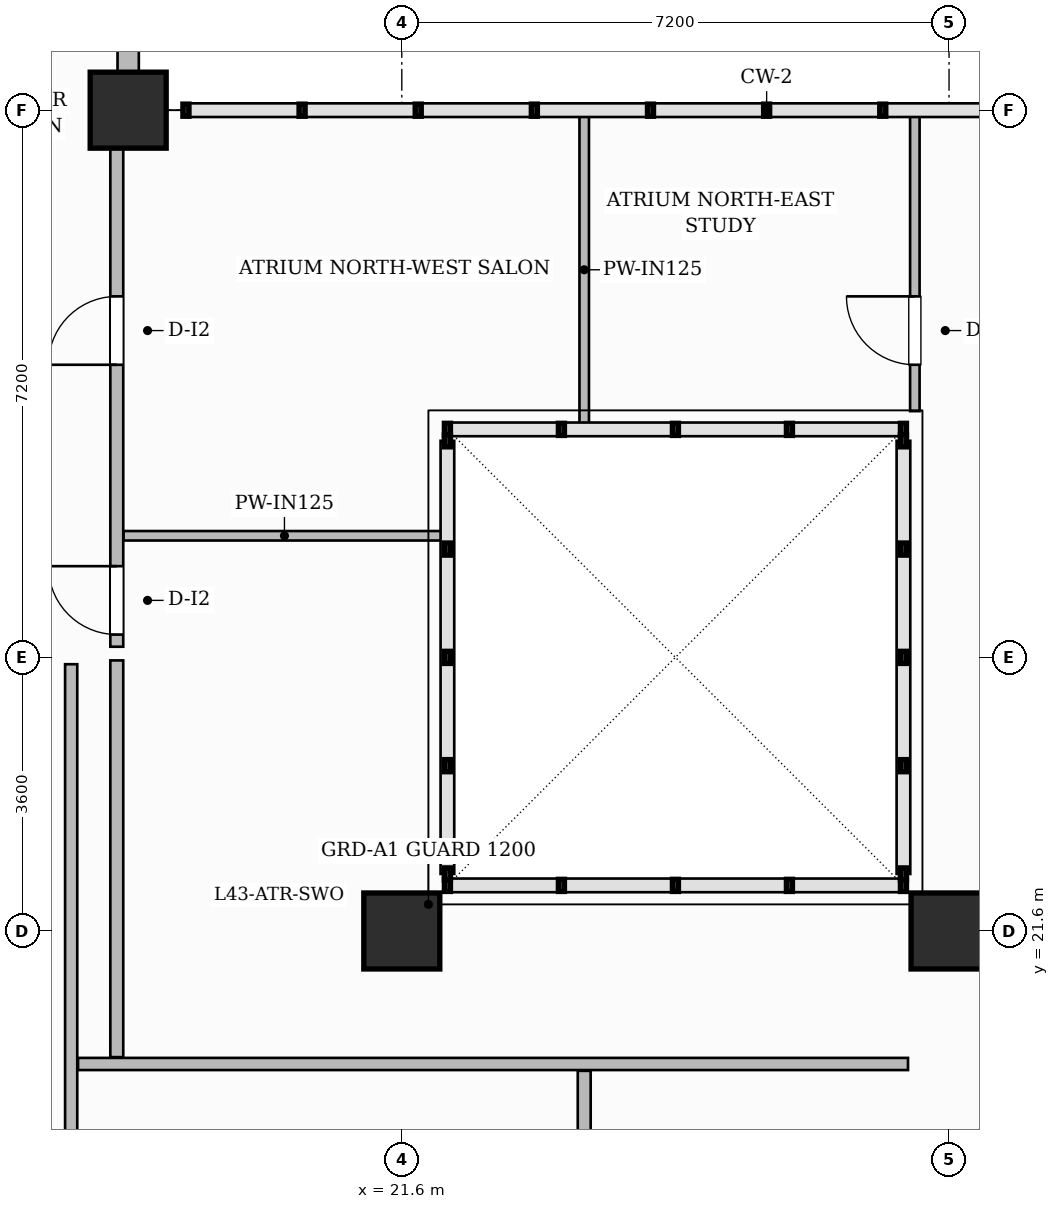
"""IFC4 building model, lengths in metres.
Left out: names, types, materials, properties, quantities, classifications, styles, units other than length and angle.
Written with IfcOpenShell. Run it as: python <this file> out.ifc"""

import sys

from ifc_helpers import new_model, si_unit, direction, frame, frame_2d, origin, origin_2d, place, context, subcontext, project, spatial, rectangle, extrude, source, transform, mapped, element, fill, save


model = new_model("IFC4")
c1 = context("Model", 3, precision=1e-05, world=origin(), true_north=direction((0.0, 1.0)))
c2 = subcontext(c1, "Body", "Model", "MODEL_VIEW")
j1 = project(units=[si_unit("LENGTHUNIT", "METRE"), si_unit("PLANEANGLEUNIT", "RADIAN")], contexts=[c1])
p1 = place(None, origin())
s1 = spatial("IfcSite", under=j1, at=p1, CompositionType="ELEMENT")
p2 = place(p1, origin())
s2 = spatial("IfcBuilding", under=s1, at=p2, CompositionType="ELEMENT")
p3 = place(p2, frame((0.0, 0.0, 173.4)))
s3 = spatial("IfcBuildingStorey", under=s2, at=p3, CompositionType="ELEMENT", Elevation=173.4)
m1 = source(origin(), c2, "Body", "SweptSolid", [
    extrude(rectangle(XDim=1.0, YDim=1.0, at=origin_2d()), origin(), (0.0, 0.0, 1.0), 3.85),
])
for number, where, z_axis, x_axis in (
    (1, (21.6, 21.6, 0.0), (0.0, 0.0, 1.0), (1.0, 0.0, 0.0)),
    (2, (28.8, 21.6, 0.0), (0.0, 0.0, 1.0), (1.0, 0.0, 0.0)),
    (3, (18.0, 32.4, 0.0), (0.0, 0.0, 1.0), (1.0, 0.0, 0.0)),
):
    element("IfcColumn", number, at=place(p3, frame(where, z_axis=z_axis, x_axis=x_axis)), inside=s3, PredefinedType="COLUMN", context=c2, shape_type="MappedRepresentation", body=[
        mapped(m1, transform((0.0, 0.0, 0.0), scale=1.0)),
    ])
p4 = place(p3, frame((17.25, 11.76, 0.0), z_axis=(0.0, 0.0, 1.0), x_axis=(0.0, 1.0, 0.0)))
e4 = element("IfcWall", 4, at=p4, inside=s3, PredefinedType="PARTITIONING", context=c2, shape_type="SweptSolid", body=[
    extrude(rectangle(XDim=13.35, YDim=0.16, at=frame_2d((6.675, 0.0))), origin(), (0.0, 0.0, 1.0), 3.6),
])
p5 = place(p3, frame((17.85, 19.94, 0.0), z_axis=(0.0, 0.0, 1.0), x_axis=(0.0, 1.0, 0.0)))
e5 = element("IfcWall", 5, at=p5, inside=s3, PredefinedType="PARTITIONING", context=c2, shape_type="SweptSolid", body=[
    extrude(rectangle(XDim=5.22, YDim=0.17, at=frame_2d((2.61, 0.0))), origin(), (0.0, 0.0, 1.0), 3.285),
])
p6 = place(p3, frame((17.85, 25.34, 0.0), z_axis=(0.0, 0.0, 1.0), x_axis=(0.0, 1.0, 0.0)))
e6 = element("IfcWall", 6, at=p6, inside=s3, PredefinedType="PARTITIONING", context=c2, shape_type="SweptSolid", body=[
    extrude(rectangle(XDim=6.87, YDim=0.17, at=frame_2d((3.435, 0.0))), origin(), (0.0, 0.0, 1.0), 3.6),
])
p7 = place(p6, frame((0.16, 0.0, 0.0)))
e7 = element("IfcOpeningElement", 7, at=p7, cuts=e6, PredefinedType="OPENING", context=c2, shape_type="SweptSolid", body=[
    extrude(rectangle(XDim=0.9, YDim=2.15, at=frame_2d((0.45, 1.075))), frame((0.0, 0.095, 0.0), z_axis=(0.0, -1.0, 0.0), x_axis=(1.0, 0.0, 0.0)), (0.0, 0.0, 1.0), 0.19),
])
p8 = place(p6, frame((3.71, 0.0, 0.0)))
e8 = element("IfcOpeningElement", 8, at=p8, cuts=e6, PredefinedType="OPENING", context=c2, shape_type="SweptSolid", body=[
    extrude(rectangle(XDim=0.9, YDim=2.15, at=frame_2d((0.45, 1.075))), frame((0.0, 0.095, 0.0), z_axis=(0.0, -1.0, 0.0), x_axis=(1.0, 0.0, 0.0)), (0.0, 0.0, 1.0), 0.19),
])
p9 = place(p3, frame((17.94, 26.8, 0.0), z_axis=(0.0, 0.0, 1.0), x_axis=(1.0, 0.0, 0.0)))
e9 = element("IfcWall", 9, at=p9, inside=s3, PredefinedType="PARTITIONING", context=c2, shape_type="SweptSolid", body=[
    extrude(rectangle(XDim=4.232, YDim=0.125, at=frame_2d((2.116, 0.0))), origin(), (0.0, 0.0, 1.0), 3.6),
])
p10 = place(p3, frame((24.0, 28.228, 0.0), z_axis=(0.0, 0.0, 1.0), x_axis=(0.0, 1.0, 0.0)))
e10 = element("IfcWall", 10, at=p10, inside=s3, PredefinedType="PARTITIONING", context=c2, shape_type="SweptSolid", body=[
    extrude(rectangle(XDim=4.144, YDim=0.125, at=frame_2d((2.072, 0.0))), origin(), (0.0, 0.0, 1.0), 3.6),
])
p11 = place(p3, frame((28.35, 28.44, 0.0), z_axis=(0.0, 0.0, 1.0), x_axis=(0.0, 1.0, 0.0)))
e11 = element("IfcWall", 11, at=p11, inside=s3, PredefinedType="PARTITIONING", context=c2, shape_type="SweptSolid", body=[
    extrude(rectangle(XDim=3.932, YDim=0.125, at=frame_2d((1.966, 0.0))), origin(), (0.0, 0.0, 1.0), 3.6),
])
p12 = place(p11, frame((0.61, 0.0, 0.0)))
e12 = element("IfcOpeningElement", 12, at=p12, cuts=e11, PredefinedType="OPENING", context=c2, shape_type="SweptSolid", body=[
    extrude(rectangle(XDim=0.9, YDim=2.15, at=frame_2d((0.45, 1.075))), frame((0.0, 0.073, 0.0), z_axis=(0.0, -1.0, 0.0), x_axis=(1.0, 0.0, 0.0)), (0.0, 0.0, 1.0), 0.145),
])
p13 = place(p3, frame((17.34, 19.85, 0.0), z_axis=(0.0, 0.0, 1.0), x_axis=(1.0, 0.0, 0.0)))
e13 = element("IfcWall", 13, at=p13, inside=s3, PredefinedType="PARTITIONING", context=c2, shape_type="SweptSolid", body=[
    extrude(rectangle(XDim=10.92, YDim=0.16, at=frame_2d((5.46, 0.0))), origin(), (0.0, 0.0, 1.0), 3.6),
])
p14 = place(p3, frame((24.0, 11.76, 0.0), z_axis=(0.0, 0.0, 1.0), x_axis=(0.0, 1.0, 0.0)))
e14 = element("IfcWall", 14, at=p14, inside=s3, PredefinedType="PARTITIONING", context=c2, shape_type="SweptSolid", body=[
    extrude(rectangle(XDim=8.0, YDim=0.17, at=frame_2d((4.0, 0.0))), origin(), (0.0, 0.0, 1.0), 3.6),
])
p15 = place(p3, frame((18.0, 32.4, 0.0), z_axis=(0.0, 0.0, 1.0), x_axis=(0.0, 1.0, 0.0)))
e15 = element("IfcWall", 15, at=p15, inside=s3, PredefinedType="SOLIDWALL", context=c2, shape_type="SweptSolid", body=[
    extrude(rectangle(XDim=14.35, YDim=0.28, at=frame_2d((7.175, 0.0))), origin(), (0.0, 0.0, 1.0), 3.6),
])
p16 = place(p15, frame((1.5, 0.0, 0.0)))
e16 = element("IfcOpeningElement", 16, at=p16, cuts=e15, PredefinedType="OPENING", context=c2, shape_type="SweptSolid", body=[
    extrude(rectangle(XDim=1.2, YDim=2.2, at=frame_2d((0.6, 1.1))), frame((0.0, 0.15, 0.0), z_axis=(0.0, -1.0, 0.0), x_axis=(1.0, 0.0, 0.0)), (0.0, 0.0, 1.0), 0.3),
])
p17 = place(p15, frame((3.8, 0.0, 0.8)))
e17 = element("IfcOpeningElement", 17, at=p17, cuts=e15, PredefinedType="OPENING", context=c2, shape_type="SweptSolid", body=[
    extrude(rectangle(XDim=1.8, YDim=1.85, at=frame_2d((0.9, 0.925))), frame((0.0, 0.15, 0.0), z_axis=(0.0, -1.0, 0.0), x_axis=(1.0, 0.0, 0.0)), (0.0, 0.0, 1.0), 0.3),
])
p18 = place(p15, frame((8.525, 0.0, 0.8)))
e18 = element("IfcOpeningElement", 18, at=p18, cuts=e15, PredefinedType="OPENING", context=c2, shape_type="SweptSolid", body=[
    extrude(rectangle(XDim=1.8, YDim=1.85, at=frame_2d((0.9, 0.925))), frame((0.0, 0.15, 0.0), z_axis=(0.0, -1.0, 0.0), x_axis=(1.0, 0.0, 0.0)), (0.0, 0.0, 1.0), 0.3),
])
p19 = place(p15, frame((11.275, 0.0, 0.8)))
e19 = element("IfcOpeningElement", 19, at=p19, cuts=e15, PredefinedType="OPENING", context=c2, shape_type="SweptSolid", body=[
    extrude(rectangle(XDim=1.8, YDim=1.85, at=frame_2d((0.9, 0.925))), frame((0.0, 0.15, 0.0), z_axis=(0.0, -1.0, 0.0), x_axis=(1.0, 0.0, 0.0)), (0.0, 0.0, 1.0), 0.3),
])
m2 = source(origin(), c2, "Body", "SweptSolid", [
    extrude(rectangle(XDim=0.9, YDim=2.15, at=frame_2d((0.45, 1.075))), frame((0.0, 0.025, 0.0), z_axis=(0.0, -1.0, 0.0), x_axis=(1.0, 0.0, 0.0)), (0.0, 0.0, 1.0), 0.05),
])
p20 = place(p7, origin())
e20 = element("IfcDoor", 20, at=p20, inside=s3, OperationType="SINGLE_SWING_RIGHT", PredefinedType="DOOR", context=c2, shape_type="MappedRepresentation", body=[
    mapped(m2, transform((0.0, 0.0, 0.0), scale=1.0)),
])
fill(e7, e20)
p21 = place(p8, origin())
e21 = element("IfcDoor", 21, at=p21, inside=s3, OperationType="SINGLE_SWING_LEFT", PredefinedType="DOOR", context=c2, shape_type="MappedRepresentation", body=[
    mapped(m2, transform((0.0, 0.0, 0.0), scale=1.0)),
])
fill(e8, e21)
p22 = place(p12, origin())
e22 = element("IfcDoor", 22, at=p22, inside=s3, OperationType="SINGLE_SWING_RIGHT", PredefinedType="DOOR", context=c2, shape_type="MappedRepresentation", body=[
    mapped(m2, transform((0.0, 0.0, 0.0), scale=1.0)),
])
fill(e12, e22)
save(model, sys.argv[1])
